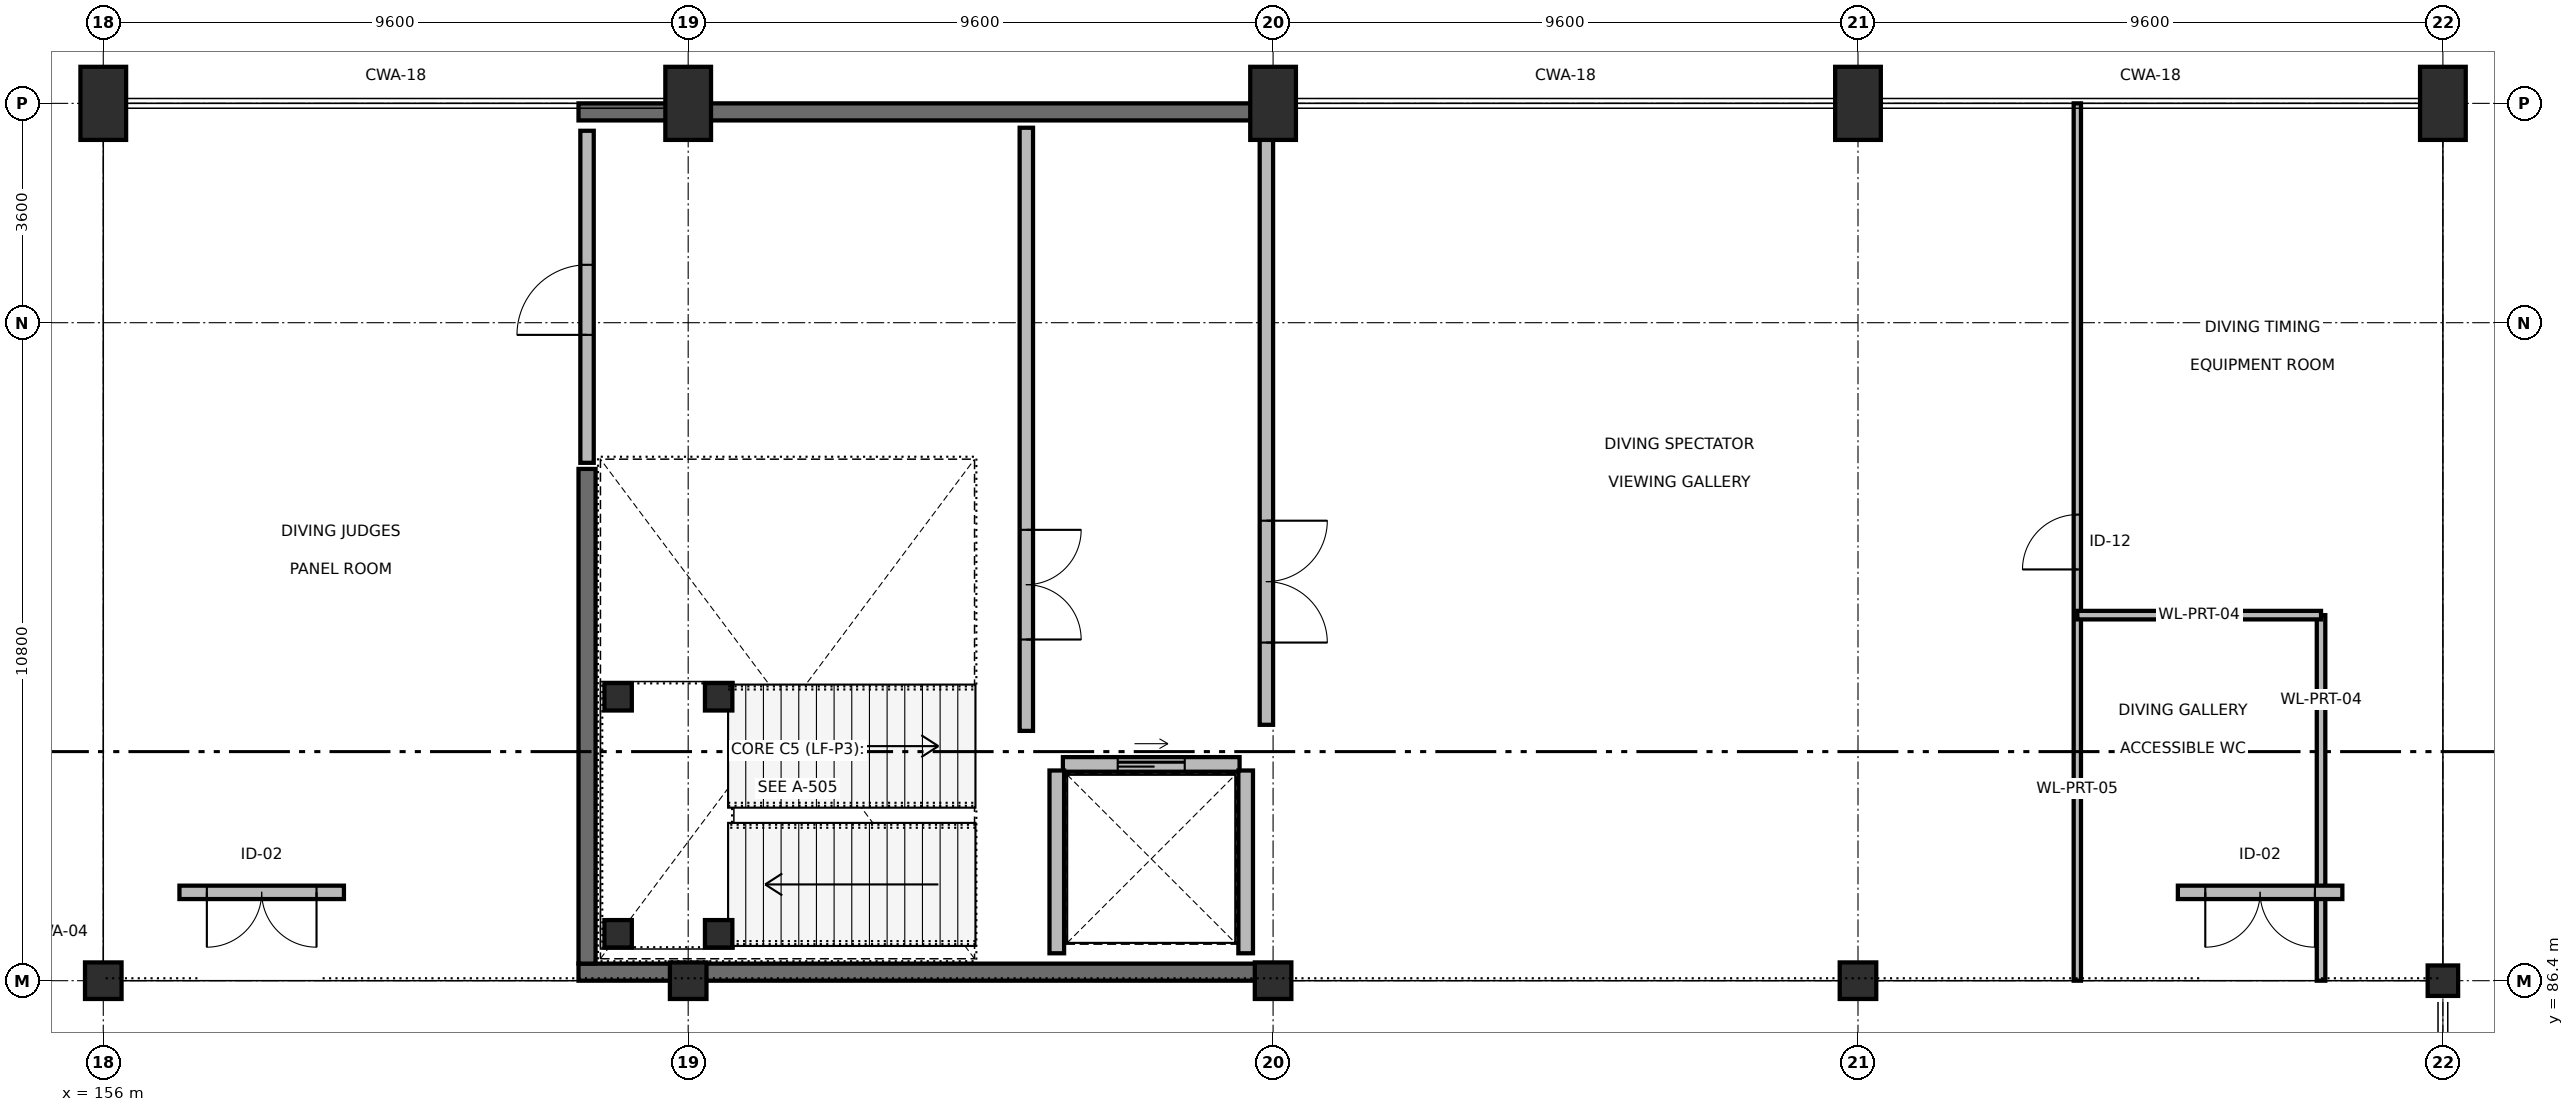
"""IFC4 building model, lengths in metres.
Left out: names, types, materials, properties, quantities, classifications, styles, units other than length and angle.
Written with IfcOpenShell. Run it as: python <this file> out.ifc"""

import sys

from ifc_helpers import new_model, si_unit, direction, frame, frame_2d, origin, origin_2d, place, context, subcontext, project, spatial, rectangle, extrude, element, fill, save


model = new_model("IFC4")
c1 = context("Model", 3, precision=1e-05, world=origin(), true_north=direction((0.0, 1.0)))
c2 = subcontext(c1, "Body", "Model", "MODEL_VIEW")
j1 = project(units=[si_unit("LENGTHUNIT", "METRE"), si_unit("PLANEANGLEUNIT", "RADIAN")], contexts=[c1])
p1 = place(None, origin())
s1 = spatial("IfcSite", under=j1, at=p1, CompositionType="ELEMENT")
p2 = place(p1, origin())
s2 = spatial("IfcBuilding", under=s1, at=p2, CompositionType="ELEMENT")
p3 = place(p2, frame((0.0, 0.0, 4.8)))
s3 = spatial("IfcBuildingStorey", under=s2, at=p3, CompositionType="ELEMENT", Elevation=4.8)
for number, where, z_axis, x_axis in (
    (1, (156.0, 100.8, 0.0), (0.0, 0.0, 1.0), (1.0, 0.0, 0.0)),
    (2, (165.6, 100.8, 0.0), (0.0, 0.0, 1.0), (1.0, 0.0, 0.0)),
    (3, (175.2, 100.8, 0.0), (0.0, 0.0, 1.0), (1.0, 0.0, 0.0)),
    (4, (184.8, 100.8, 0.0), (0.0, 0.0, 1.0), (1.0, 0.0, 0.0)),
    (5, (194.4, 100.8, 0.0), (0.0, 0.0, 1.0), (1.0, 0.0, 0.0)),
):
    element("IfcColumn", number, at=place(p3, frame(where, z_axis=z_axis, x_axis=x_axis)), inside=s3, PredefinedType="COLUMN", context=c2, shape_type="SweptSolid", body=[
        extrude(rectangle(XDim=0.75, YDim=1.2, at=origin_2d()), origin(), (0.0, 0.0, 1.0), 4.8),
    ])
for number, where, z_axis, x_axis in (
    (6, (156.0, 86.4, 0.0), (0.0, 0.0, 1.0), (1.0, 0.0, 0.0)),
    (7, (165.6, 86.4, 0.0), (0.0, 0.0, 1.0), (1.0, 0.0, 0.0)),
    (8, (175.2, 86.4, 0.0), (0.0, 0.0, 1.0), (1.0, 0.0, 0.0)),
    (9, (184.8, 86.4, 0.0), (0.0, 0.0, 1.0), (1.0, 0.0, 0.0)),
):
    element("IfcColumn", number, at=place(p3, frame(where, z_axis=z_axis, x_axis=x_axis)), inside=s3, PredefinedType="COLUMN", context=c2, shape_type="SweptSolid", body=[
        extrude(rectangle(XDim=0.6, YDim=0.6, at=origin_2d()), origin(), (0.0, 0.0, 1.0), 4.8),
    ])
p4 = place(p3, frame((194.4, 86.4, 0.0), z_axis=(0.0, 0.0, 1.0), x_axis=(1.0, 0.0, 0.0)))
e10 = element("IfcColumn", 10, at=p4, inside=s3, PredefinedType="COLUMN", context=c2, shape_type="SweptSolid", body=[
    extrude(rectangle(XDim=0.5, YDim=0.5, at=origin_2d()), origin(), (0.0, 0.0, 1.0), 4.8),
])
for number, where, z_axis, x_axis in (
    (11, (163.8, 86.54, 0.0), (0.0, 0.0, 1.0), (1.0, 0.0, 0.0)),
    (12, (163.8, 100.66, 0.0), (0.0, 0.0, 1.0), (1.0, 0.0, 0.0)),
):
    element("IfcWall", number, at=place(p3, frame(where, z_axis=z_axis, x_axis=x_axis)), inside=s3, PredefinedType="SHEAR", context=c2, shape_type="SweptSolid", body=[
        extrude(rectangle(XDim=11.4, YDim=0.28, at=frame_2d((5.7, 0.0))), origin(), (0.0, 0.0, 1.0), 4.8),
    ])
p5 = place(p3, frame((163.94, 86.68, 0.0), z_axis=(0.0, 0.0, 1.0), x_axis=(0.0, 1.0, 0.0)))
e13 = element("IfcWall", 13, at=p5, inside=s3, PredefinedType="SHEAR", context=c2, shape_type="SweptSolid", body=[
    extrude(rectangle(XDim=8.12, YDim=0.28, at=frame_2d((4.06, 0.0))), origin(), (0.0, 0.0, 1.0), 4.8),
])
p6 = place(p3, frame((171.15, 90.5, 0.0), z_axis=(0.0, 0.0, 1.0), x_axis=(0.0, 1.0, 0.0)))
e14 = element("IfcWall", 14, at=p6, inside=s3, PredefinedType="PARTITIONING", context=c2, shape_type="SweptSolid", body=[
    extrude(rectangle(XDim=9.9, YDim=0.22, at=frame_2d((4.95, 0.0))), origin(), (0.0, 0.0, 1.0), 4.505),
])
p7 = place(p6, frame((1.5, 0.0, 0.0)))
e15 = element("IfcOpeningElement", 15, at=p7, cuts=e14, PredefinedType="OPENING", context=c2, shape_type="SweptSolid", body=[
    extrude(rectangle(XDim=1.8, YDim=2.2, at=frame_2d((0.9, 1.1))), frame((0.0, 0.12, 0.0), z_axis=(0.0, -1.0, 0.0), x_axis=(1.0, 0.0, 0.0)), (0.0, 0.0, 1.0), 0.24),
])
p8 = place(p3, frame((171.75, 89.95, 0.0), z_axis=(0.0, 0.0, 1.0), x_axis=(1.0, 0.0, 0.0)))
e16 = element("IfcWall", 16, at=p8, inside=s3, PredefinedType="SOLIDWALL", context=c2, shape_type="SweptSolid", body=[
    extrude(rectangle(XDim=2.9, YDim=0.24, at=frame_2d((1.45, 0.0))), origin(), (0.0, 0.0, 1.0), 4.505),
])
p9 = place(p8, frame((0.9, 0.0, 0.0)))
e17 = element("IfcOpeningElement", 17, at=p9, cuts=e16, PredefinedType="OPENING", context=c2, shape_type="SweptSolid", body=[
    extrude(rectangle(XDim=1.1, YDim=2.15, at=frame_2d((0.55, 1.075))), frame((0.0, 0.13, 0.0), z_axis=(0.0, -1.0, 0.0), x_axis=(1.0, 0.0, 0.0)), (0.0, 0.0, 1.0), 0.26),
])
for number, where, z_axis, x_axis in (
    (18, (171.65, 86.85, 0.0), (0.0, 0.0, 1.0), (0.0, 1.0, 0.0)),
    (19, (174.75, 86.85, 0.0), (0.0, 0.0, 1.0), (0.0, 1.0, 0.0)),
):
    element("IfcWall", number, at=place(p3, frame(where, z_axis=z_axis, x_axis=x_axis)), inside=s3, PredefinedType="SOLIDWALL", context=c2, shape_type="SweptSolid", body=[
        extrude(rectangle(XDim=3.0, YDim=0.24, at=frame_2d((1.5, 0.0))), origin(), (0.0, 0.0, 1.0), 4.505),
    ])
p10 = place(p3, frame((175.09, 90.6, 0.0), z_axis=(0.0, 0.0, 1.0), x_axis=(0.0, 1.0, 0.0)))
e20 = element("IfcWall", 20, at=p10, inside=s3, PredefinedType="PARTITIONING", context=c2, shape_type="SweptSolid", body=[
    extrude(rectangle(XDim=9.75, YDim=0.22, at=frame_2d((4.875, 0.0))), origin(), (0.0, 0.0, 1.0), 3.785),
])
p11 = place(p10, frame((1.35, 0.0, 0.0)))
e21 = element("IfcOpeningElement", 21, at=p11, cuts=e20, PredefinedType="OPENING", context=c2, shape_type="SweptSolid", body=[
    extrude(rectangle(XDim=2.0, YDim=2.2, at=frame_2d((1.0, 1.1))), frame((0.0, 0.12, 0.0), z_axis=(0.0, -1.0, 0.0), x_axis=(1.0, 0.0, 0.0)), (0.0, 0.0, 1.0), 0.24),
])
p12 = place(p3, frame((163.94, 94.9, 0.0), z_axis=(0.0, 0.0, 1.0), x_axis=(0.0, 1.0, 0.0)))
e22 = element("IfcWall", 22, at=p12, inside=s3, PredefinedType="PARTITIONING", context=c2, shape_type="SweptSolid", body=[
    extrude(rectangle(XDim=5.45, YDim=0.22, at=frame_2d((2.725, 0.0))), origin(), (0.0, 0.0, 1.0), 4.505),
])
p13 = place(p12, frame((2.1, 0.0, 0.0)))
e23 = element("IfcOpeningElement", 23, at=p13, cuts=e22, PredefinedType="OPENING", context=c2, shape_type="SweptSolid", body=[
    extrude(rectangle(XDim=1.15, YDim=2.2, at=frame_2d((0.575, 1.1))), frame((0.0, 0.12, 0.0), z_axis=(0.0, -1.0, 0.0), x_axis=(1.0, 0.0, 0.0)), (0.0, 0.0, 1.0), 0.24),
])
p14 = place(p3, frame((188.4, 86.4, 0.0), z_axis=(0.0, 0.0, 1.0), x_axis=(0.0, 1.0, 0.0)))
e24 = element("IfcWall", 24, at=p14, inside=s3, PredefinedType="PARTITIONING", context=c2, shape_type="SweptSolid", body=[
    extrude(rectangle(XDim=14.4, YDim=0.12, at=frame_2d((7.2, 0.0))), origin(), (0.0, 0.0, 1.0), 3.835),
])
p15 = place(p14, frame((6.75, 0.0, 0.0)))
e25 = element("IfcOpeningElement", 25, at=p15, cuts=e24, PredefinedType="OPENING", context=c2, shape_type="SweptSolid", body=[
    extrude(rectangle(XDim=0.9, YDim=2.1, at=frame_2d((0.45, 1.05))), frame((0.0, 0.07, 0.0), z_axis=(0.0, -1.0, 0.0), x_axis=(1.0, 0.0, 0.0)), (0.0, 0.0, 1.0), 0.14),
])
p16 = place(p3, frame((192.4, 86.4, 0.0), z_axis=(0.0, 0.0, 1.0), x_axis=(0.0, 1.0, 0.0)))
e26 = element("IfcWall", 26, at=p16, inside=s3, PredefinedType="PARTITIONING", context=c2, shape_type="SweptSolid", body=[
    extrude(rectangle(XDim=6.0, YDim=0.14, at=frame_2d((3.0, 0.0))), origin(), (0.0, 0.0, 1.0), 3.835),
])
p17 = place(p3, frame((188.4, 92.4, 0.0), z_axis=(0.0, 0.0, 1.0), x_axis=(1.0, 0.0, 0.0)))
e27 = element("IfcWall", 27, at=p17, inside=s3, PredefinedType="PARTITIONING", context=c2, shape_type="SweptSolid", body=[
    extrude(rectangle(XDim=4.0, YDim=0.14, at=frame_2d((2.0, 0.0))), origin(), (0.0, 0.0, 1.0), 4.505),
])
for number, where, z_axis, x_axis in (
    (28, (164.45, 87.17, 0.0), (0.0, 0.0, 1.0), (1.0, 0.0, 0.0)),
    (29, (166.1, 87.17, 0.0), (0.0, 0.0, 1.0), (1.0, 0.0, 0.0)),
    (30, (164.45, 91.06, 0.0), (0.0, 0.0, 1.0), (1.0, 0.0, 0.0)),
    (31, (166.1, 91.06, 0.0), (0.0, 0.0, 1.0), (1.0, 0.0, 0.0)),
):
    element("IfcColumn", number, at=place(p3, frame(where, z_axis=z_axis, x_axis=x_axis)), inside=s3, PredefinedType="COLUMN", context=c2, shape_type="SweptSolid", body=[
        extrude(rectangle(XDim=0.45, YDim=0.45, at=origin_2d()), origin(), (0.0, 0.0, 1.0), 4.8),
    ])
p18 = place(p3, frame((157.25, 87.85, 0.0), z_axis=(0.0, 0.0, 1.0), x_axis=(1.0, 0.0, 0.0)))
e32 = element("IfcWall", 32, at=p18, inside=s3, PredefinedType="PARTITIONING", context=c2, shape_type="SweptSolid", body=[
    extrude(rectangle(XDim=2.7, YDim=0.22, at=frame_2d((1.35, 0.0))), origin(), (0.0, 0.0, 1.0), 4.285),
])
p19 = place(p18, frame((0.45, 0.0, 0.0)))
e33 = element("IfcOpeningElement", 33, at=p19, cuts=e32, PredefinedType="OPENING", context=c2, shape_type="SweptSolid", body=[
    extrude(rectangle(XDim=1.8, YDim=2.2, at=frame_2d((0.9, 1.1))), frame((0.0, 0.12, 0.0), z_axis=(0.0, -1.0, 0.0), x_axis=(1.0, 0.0, 0.0)), (0.0, 0.0, 1.0), 0.24),
])
p20 = place(p3, frame((190.05, 87.85, 0.0), z_axis=(0.0, 0.0, 1.0), x_axis=(1.0, 0.0, 0.0)))
e34 = element("IfcWall", 34, at=p20, inside=s3, PredefinedType="PARTITIONING", context=c2, shape_type="SweptSolid", body=[
    extrude(rectangle(XDim=2.7, YDim=0.22, at=frame_2d((1.35, 0.0))), origin(), (0.0, 0.0, 1.0), 4.285),
])
p21 = place(p20, frame((0.45, 0.0, 0.0)))
e35 = element("IfcOpeningElement", 35, at=p21, cuts=e34, PredefinedType="OPENING", context=c2, shape_type="SweptSolid", body=[
    extrude(rectangle(XDim=1.8, YDim=2.2, at=frame_2d((0.9, 1.1))), frame((0.0, 0.12, 0.0), z_axis=(0.0, -1.0, 0.0), x_axis=(1.0, 0.0, 0.0)), (0.0, 0.0, 1.0), 0.24),
])
p22 = place(p7, origin())
e36 = element("IfcDoor", 36, at=p22, inside=s3, OperationType="DOUBLE_DOOR_SINGLE_SWING", PredefinedType="DOOR", context=c2, shape_type="SweptSolid", body=[
    extrude(rectangle(XDim=1.8, YDim=2.2, at=frame_2d((0.9, 1.1))), frame((0.0, 0.025, 0.0), z_axis=(0.0, -1.0, 0.0), x_axis=(1.0, 0.0, 0.0)), (0.0, 0.0, 1.0), 0.05),
])
fill(e15, e36)
p23 = place(p9, origin())
e37 = element("IfcDoor", 37, at=p23, inside=s3, OperationType="DOUBLE_DOOR_SLIDING", PredefinedType="DOOR", context=c2, shape_type="SweptSolid", body=[
    extrude(rectangle(XDim=1.1, YDim=2.15, at=frame_2d((0.55, 1.075))), frame((0.0, 0.025, 0.0), z_axis=(0.0, -1.0, 0.0), x_axis=(1.0, 0.0, 0.0)), (0.0, 0.0, 1.0), 0.05),
])
fill(e17, e37)
p24 = place(p11, origin())
e38 = element("IfcDoor", 38, at=p24, inside=s3, OperationType="DOUBLE_DOOR_SINGLE_SWING", PredefinedType="DOOR", context=c2, shape_type="SweptSolid", body=[
    extrude(rectangle(XDim=2.0, YDim=2.2, at=frame_2d((1.0, 1.1))), frame((0.0, 0.025, 0.0), z_axis=(0.0, -1.0, 0.0), x_axis=(1.0, 0.0, 0.0)), (0.0, 0.0, 1.0), 0.05),
])
fill(e21, e38)
p25 = place(p13, origin())
e39 = element("IfcDoor", 39, at=p25, inside=s3, OperationType="SINGLE_SWING_LEFT", PredefinedType="DOOR", context=c2, shape_type="SweptSolid", body=[
    extrude(rectangle(XDim=1.15, YDim=2.2, at=frame_2d((0.575, 1.1))), frame((0.0, 0.025, 0.0), z_axis=(0.0, -1.0, 0.0), x_axis=(1.0, 0.0, 0.0)), (0.0, 0.0, 1.0), 0.05),
])
fill(e23, e39)
p26 = place(p15, origin())
e40 = element("IfcDoor", 40, at=p26, inside=s3, OperationType="SINGLE_SWING_LEFT", PredefinedType="DOOR", context=c2, shape_type="SweptSolid", body=[
    extrude(rectangle(XDim=0.9, YDim=2.1, at=frame_2d((0.45, 1.05))), frame((0.0, 0.025, 0.0), z_axis=(0.0, -1.0, 0.0), x_axis=(1.0, 0.0, 0.0)), (0.0, 0.0, 1.0), 0.05),
])
fill(e25, e40)
p27 = place(p19, origin())
e41 = element("IfcDoor", 41, at=p27, inside=s3, OperationType="DOUBLE_DOOR_SINGLE_SWING", PredefinedType="DOOR", context=c2, shape_type="SweptSolid", body=[
    extrude(rectangle(XDim=1.8, YDim=2.2, at=frame_2d((0.9, 1.1))), frame((0.0, 0.025, 0.0), z_axis=(0.0, -1.0, 0.0), x_axis=(1.0, 0.0, 0.0)), (0.0, 0.0, 1.0), 0.05),
])
fill(e33, e41)
p28 = place(p21, origin())
e42 = element("IfcDoor", 42, at=p28, inside=s3, OperationType="DOUBLE_DOOR_SINGLE_SWING", PredefinedType="DOOR", context=c2, shape_type="SweptSolid", body=[
    extrude(rectangle(XDim=1.8, YDim=2.2, at=frame_2d((0.9, 1.1))), frame((0.0, 0.025, 0.0), z_axis=(0.0, -1.0, 0.0), x_axis=(1.0, 0.0, 0.0)), (0.0, 0.0, 1.0), 0.05),
])
fill(e35, e42)
save(model, sys.argv[1])
